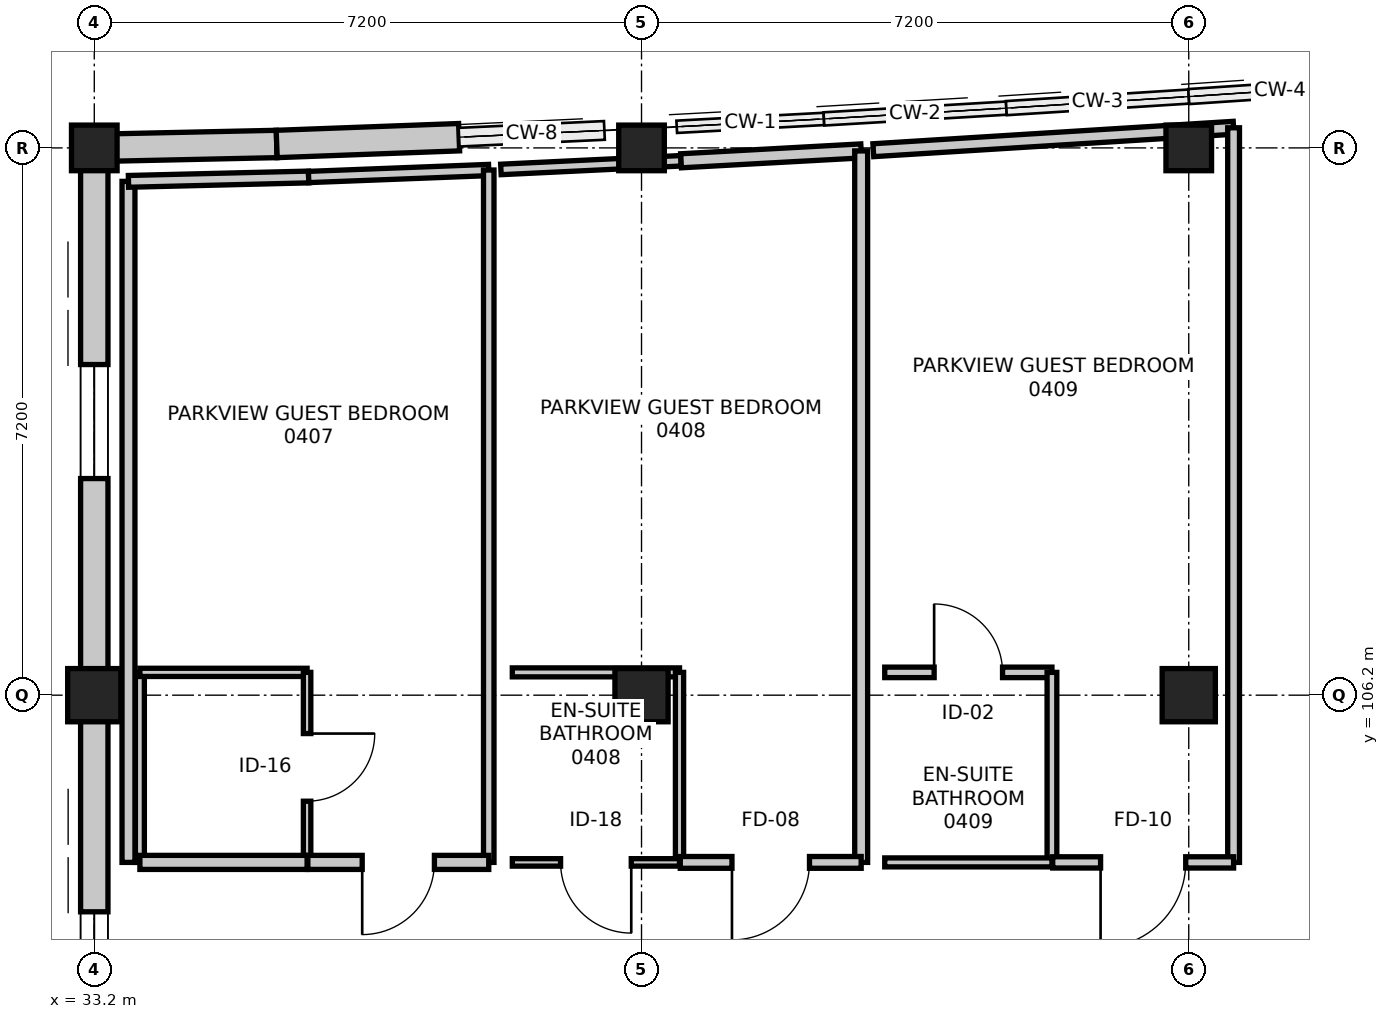
"""IFC4 building model, lengths in metres.
Left out: names, types, materials, properties, quantities, classifications, styles, units other than length and angle.
Written with IfcOpenShell. Run it as: python <this file> out.ifc"""

import sys

from ifc_helpers import new_model, si_unit, direction, frame, frame_2d, origin, origin_2d, place, context, subcontext, project, spatial, rectangle, extrude, element, fill, save


model = new_model("IFC4")
c1 = context("Model", 3, precision=1e-05, world=origin(), true_north=direction((0.0, 1.0)))
c2 = subcontext(c1, "Body", "Model", "MODEL_VIEW")
j1 = project(units=[si_unit("LENGTHUNIT", "METRE"), si_unit("PLANEANGLEUNIT", "RADIAN")], contexts=[c1])
p1 = place(None, origin())
s1 = spatial("IfcSite", under=j1, at=p1, CompositionType="ELEMENT")
p2 = place(p1, origin())
s2 = spatial("IfcBuilding", under=s1, at=p2, CompositionType="ELEMENT")
p3 = place(p2, frame((0.0, 0.0, 19.2)))
s3 = spatial("IfcBuildingStorey", under=s2, at=p3, CompositionType="ELEMENT", Elevation=19.2)
p4 = place(p3, frame((33.2, 106.2, 0.0), z_axis=(0.0, 0.0, 1.0), x_axis=(1.0, 0.0, 0.0)))
e1 = element("IfcColumn", 1, at=p4, inside=s3, PredefinedType="COLUMN", context=c2, shape_type="SweptSolid", body=[
    extrude(rectangle(XDim=0.7, YDim=0.7, at=origin_2d()), origin(), (0.0, 0.0, 1.0), 3.6),
])
p5 = place(p3, frame((33.2, 113.4, 0.0), z_axis=(0.0, 0.0, 1.0), x_axis=(1.0, 0.0, 0.0)))
e2 = element("IfcColumn", 2, at=p5, inside=s3, PredefinedType="COLUMN", context=c2, shape_type="SweptSolid", body=[
    extrude(rectangle(XDim=0.6, YDim=0.6, at=origin_2d()), origin(), (0.0, 0.0, 1.0), 3.6),
])
p6 = place(p3, frame((40.4, 106.2, 0.0), z_axis=(0.0, 0.0, 1.0), x_axis=(1.0, 0.0, 0.0)))
e3 = element("IfcColumn", 3, at=p6, inside=s3, PredefinedType="COLUMN", context=c2, shape_type="SweptSolid", body=[
    extrude(rectangle(XDim=0.7, YDim=0.7, at=origin_2d()), origin(), (0.0, 0.0, 1.0), 3.6),
])
p7 = place(p3, frame((40.4, 113.4, 0.0), z_axis=(0.0, 0.0, 1.0), x_axis=(1.0, 0.0, 0.0)))
e4 = element("IfcColumn", 4, at=p7, inside=s3, PredefinedType="COLUMN", context=c2, shape_type="SweptSolid", body=[
    extrude(rectangle(XDim=0.6, YDim=0.6, at=origin_2d()), origin(), (0.0, 0.0, 1.0), 3.6),
])
p8 = place(p3, frame((47.6, 106.2, 0.0), z_axis=(0.0, 0.0, 1.0), x_axis=(1.0, 0.0, 0.0)))
e5 = element("IfcColumn", 5, at=p8, inside=s3, PredefinedType="COLUMN", context=c2, shape_type="SweptSolid", body=[
    extrude(rectangle(XDim=0.7, YDim=0.7, at=origin_2d()), origin(), (0.0, 0.0, 1.0), 3.6),
])
p9 = place(p3, frame((47.6, 113.4, 0.0), z_axis=(0.0, 0.0, 1.0), x_axis=(1.0, 0.0, 0.0)))
e6 = element("IfcColumn", 6, at=p9, inside=s3, PredefinedType="COLUMN", context=c2, shape_type="SweptSolid", body=[
    extrude(rectangle(XDim=0.6, YDim=0.6, at=origin_2d()), origin(), (0.0, 0.0, 1.0), 3.6),
])
p10 = place(p3, frame((33.2, 99.0, 0.0), z_axis=(0.0, 0.0, 1.0), x_axis=(0.0, 1.0, 0.0)))
e7 = element("IfcWall", 7, at=p10, inside=s3, PredefinedType="STANDARD", context=c2, shape_type="SweptSolid", body=[
    extrude(rectangle(XDim=7.2, YDim=0.36, at=frame_2d((3.6, 0.0))), origin(), (0.0, 0.0, 1.0), 2.685),
])
p11 = place(p10, frame((2.85, 0.0, 0.75)))
e8 = element("IfcOpeningElement", 8, at=p11, cuts=e7, PredefinedType="OPENING", context=c2, shape_type="SweptSolid", body=[
    extrude(rectangle(XDim=1.5, YDim=1.5, at=frame_2d((0.75, 0.75))), frame((0.0, 0.19, 0.0), z_axis=(0.0, -1.0, 0.0), x_axis=(1.0, 0.0, 0.0)), (0.0, 0.0, 1.0), 0.38),
])
p12 = place(p3, frame((33.2, 106.2, 0.0), z_axis=(0.0, 0.0, 1.0), x_axis=(0.0, 1.0, 0.0)))
e9 = element("IfcWall", 9, at=p12, inside=s3, PredefinedType="STANDARD", context=c2, shape_type="SweptSolid", body=[
    extrude(rectangle(XDim=7.2, YDim=0.36, at=frame_2d((3.6, 0.0))), origin(), (0.0, 0.0, 1.0), 2.685),
])
p13 = place(p12, frame((2.85, 0.0, 0.75)))
e10 = element("IfcOpeningElement", 10, at=p13, cuts=e9, PredefinedType="OPENING", context=c2, shape_type="SweptSolid", body=[
    extrude(rectangle(XDim=1.5, YDim=1.5, at=frame_2d((0.75, 0.75))), frame((0.0, 0.19, 0.0), z_axis=(0.0, -1.0, 0.0), x_axis=(1.0, 0.0, 0.0)), (0.0, 0.0, 1.0), 0.38),
])
p14 = place(p3, frame((33.2, 113.4, 0.0), z_axis=(0.0, 0.0, 1.0), x_axis=(0.999767568547, 0.021559426766, 0.0)))
e11 = element("IfcWall", 11, at=p14, inside=s3, PredefinedType="STANDARD", context=c2, shape_type="SweptSolid", body=[
    extrude(rectangle(XDim=2.401, YDim=0.36, at=frame_2d((1.2, 0.0))), origin(), (0.0, 0.0, 1.0), 2.735),
])
p15 = place(p3, frame((35.6, 113.452, 0.0), z_axis=(0.0, 0.0, 1.0), x_axis=(0.99930757318, 0.037207179225, 0.0)))
e12 = element("IfcWall", 12, at=p15, inside=s3, PredefinedType="STANDARD", context=c2, shape_type="SweptSolid", body=[
    extrude(rectangle(XDim=2.402, YDim=0.36, at=frame_2d((1.201, 0.0))), origin(), (0.0, 0.0, 1.0), 2.735),
])
p16 = place(p3, frame((33.8, 104.0, 0.0), z_axis=(0.0, 0.0, 1.0), x_axis=(0.0, 1.0, 0.0)))
e13 = element("IfcWall", 13, at=p16, inside=s3, PredefinedType="PARTITIONING", context=c2, shape_type="SweptSolid", body=[
    extrude(rectangle(XDim=2.5, YDim=0.118, at=frame_2d((1.25, 0.0))), origin(), (0.0, 0.0, 1.0), 2.735),
])
p17 = place(p3, frame((33.8, 106.5, 0.0), z_axis=(0.0, 0.0, 1.0), x_axis=(1.0, 0.0, 0.0)))
e14 = element("IfcWall", 14, at=p17, inside=s3, PredefinedType="PARTITIONING", context=c2, shape_type="SweptSolid", body=[
    extrude(rectangle(XDim=2.2, YDim=0.108, at=frame_2d((1.1, 0.0))), origin(), (0.0, 0.0, 1.0), 3.35),
])
p18 = place(p3, frame((36.0, 106.5, 0.0), z_axis=(0.0, 0.0, 1.0), x_axis=(0.0, -1.0, 0.0)))
e15 = element("IfcWall", 15, at=p18, inside=s3, PredefinedType="PARTITIONING", context=c2, shape_type="SweptSolid", body=[
    extrude(rectangle(XDim=2.5, YDim=0.098, at=frame_2d((1.25, 0.0))), origin(), (0.0, 0.0, 1.0), 2.735),
])
p19 = place(p18, frame((0.805, 0.0, 0.0)))
e16 = element("IfcOpeningElement", 16, at=p19, cuts=e15, PredefinedType="OPENING", context=c2, shape_type="SweptSolid", body=[
    extrude(rectangle(XDim=0.89, YDim=2.09, at=frame_2d((0.445, 1.045))), frame((0.0, 0.059, 0.0), z_axis=(0.0, -1.0, 0.0), x_axis=(1.0, 0.0, 0.0)), (0.0, 0.0, 1.0), 0.118),
])
p20 = place(p3, frame((36.0, 104.0, 0.0), z_axis=(0.0, 0.0, 1.0), x_axis=(-1.0, 0.0, 0.0)))
e17 = element("IfcWall", 17, at=p20, inside=s3, PredefinedType="PARTITIONING", context=c2, shape_type="SweptSolid", body=[
    extrude(rectangle(XDim=2.2, YDim=0.185, at=frame_2d((1.1, 0.0))), origin(), (0.0, 0.0, 1.0), 3.35),
])
p21 = place(p3, frame((33.65, 104.0, 0.0), z_axis=(0.0, 0.0, 1.0), x_axis=(0.0, 1.0, 0.0)))
e18 = element("IfcWall", 18, at=p21, inside=s3, PredefinedType="PARTITIONING", context=c2, shape_type="SweptSolid", body=[
    extrude(rectangle(XDim=8.96, YDim=0.17, at=frame_2d((4.48, 0.0))), origin(), (0.0, 0.0, 1.0), 2.735),
])
p22 = place(p3, frame((33.65, 112.96, 0.0), z_axis=(0.0, 0.0, 1.0), x_axis=(0.999704646558, 0.024302667551, 0.0)))
e19 = element("IfcWall", 19, at=p22, inside=s3, PredefinedType="PARTITIONING", context=c2, shape_type="SweptSolid", body=[
    extrude(rectangle(XDim=2.371, YDim=0.155, at=frame_2d((1.186, 0.0))), origin(), (0.0, 0.0, 1.0), 3.35),
])
p23 = place(p3, frame((36.02, 113.017, 0.0), z_axis=(0.0, 0.0, 1.0), x_axis=(0.999250645602, 0.03870590736, 0.0)))
e20 = element("IfcWall", 20, at=p23, inside=s3, PredefinedType="PARTITIONING", context=c2, shape_type="SweptSolid", body=[
    extrude(rectangle(XDim=2.372, YDim=0.148, at=frame_2d((1.186, 0.0))), origin(), (0.0, 0.0, 1.0), 3.35),
])
p24 = place(p3, frame((38.39, 113.109, 0.0), z_axis=(0.0, 0.0, 1.0), x_axis=(0.0, -1.0, 0.0)))
e21 = element("IfcWall", 21, at=p24, inside=s3, PredefinedType="PARTITIONING", context=c2, shape_type="SweptSolid", body=[
    extrude(rectangle(XDim=9.109, YDim=0.138, at=frame_2d((4.555, 0.0))), origin(), (0.0, 0.0, 1.0), 2.735),
])
p25 = place(p3, frame((38.39, 104.0, 0.0), z_axis=(0.0, 0.0, 1.0), x_axis=(-1.0, 0.0, 0.0)))
e22 = element("IfcWall", 22, at=p25, inside=s3, PredefinedType="PARTITIONING", context=c2, shape_type="SweptSolid", body=[
    extrude(rectangle(XDim=2.38, YDim=0.185, at=frame_2d((1.19, 0.0))), origin(), (0.0, 0.0, 1.0), 3.35),
])
p26 = place(p25, frame((0.715, 0.0, 0.0)))
e23 = element("IfcOpeningElement", 23, at=p26, cuts=e22, PredefinedType="OPENING", context=c2, shape_type="SweptSolid", body=[
    extrude(rectangle(XDim=0.95, YDim=2.1, at=frame_2d((0.475, 1.05))), frame((0.0, 0.103, 0.0), z_axis=(0.0, -1.0, 0.0), x_axis=(1.0, 0.0, 0.0)), (0.0, 0.0, 1.0), 0.205),
])
p27 = place(p3, frame((38.7, 106.5, 0.0), z_axis=(0.0, 0.0, 1.0), x_axis=(1.0, 0.0, 0.0)))
e24 = element("IfcWall", 24, at=p27, inside=s3, PredefinedType="PARTITIONING", context=c2, shape_type="SweptSolid", body=[
    extrude(rectangle(XDim=2.2, YDim=0.118, at=frame_2d((1.1, 0.0))), origin(), (0.0, 0.0, 1.0), 2.685),
])
p28 = place(p3, frame((40.9, 106.5, 0.0), z_axis=(0.0, 0.0, 1.0), x_axis=(0.0, -1.0, 0.0)))
e25 = element("IfcWall", 25, at=p28, inside=s3, PredefinedType="PARTITIONING", context=c2, shape_type="SweptSolid", body=[
    extrude(rectangle(XDim=2.5, YDim=0.108, at=frame_2d((1.25, 0.0))), origin(), (0.0, 0.0, 1.0), 2.735),
])
p29 = place(p3, frame((40.9, 104.0, 0.0), z_axis=(0.0, 0.0, 1.0), x_axis=(-1.0, 0.0, 0.0)))
e26 = element("IfcWall", 26, at=p29, inside=s3, PredefinedType="PARTITIONING", context=c2, shape_type="SweptSolid", body=[
    extrude(rectangle(XDim=2.2, YDim=0.098, at=frame_2d((1.1, 0.0))), origin(), (0.0, 0.0, 1.0), 2.685),
])
p30 = place(p29, frame((0.635, 0.0, 0.0)))
e27 = element("IfcOpeningElement", 27, at=p30, cuts=e26, PredefinedType="OPENING", context=c2, shape_type="SweptSolid", body=[
    extrude(rectangle(XDim=0.93, YDim=2.13, at=frame_2d((0.465, 1.065))), frame((0.0, 0.059, 0.0), z_axis=(0.0, -1.0, 0.0), x_axis=(1.0, 0.0, 0.0)), (0.0, 0.0, 1.0), 0.118),
])
p31 = place(p3, frame((38.55, 113.117, 0.0), z_axis=(0.0, 0.0, 1.0), x_axis=(0.99884473767, 0.048054032398, 0.0)))
e28 = element("IfcWall", 28, at=p31, inside=s3, PredefinedType="PARTITIONING", context=c2, shape_type="SweptSolid", body=[
    extrude(rectangle(XDim=2.373, YDim=0.138, at=frame_2d((1.186, 0.0))), origin(), (0.0, 0.0, 1.0), 2.735),
])
p32 = place(p3, frame((40.92, 113.231, 0.0), z_axis=(0.0, 0.0, 1.0), x_axis=(0.998507458691, 0.054615519218, 0.0)))
e29 = element("IfcWall", 29, at=p32, inside=s3, PredefinedType="PARTITIONING", context=c2, shape_type="SweptSolid", body=[
    extrude(rectangle(XDim=2.374, YDim=0.185, at=frame_2d((1.187, 0.0))), origin(), (0.0, 0.0, 1.0), 2.735),
])
p33 = place(p3, frame((43.29, 113.36, 0.0), z_axis=(0.0, 0.0, 1.0), x_axis=(0.0, -1.0, 0.0)))
e30 = element("IfcWall", 30, at=p33, inside=s3, PredefinedType="PARTITIONING", context=c2, shape_type="SweptSolid", body=[
    extrude(rectangle(XDim=9.36, YDim=0.17, at=frame_2d((4.68, 0.0))), origin(), (0.0, 0.0, 1.0), 2.735),
])
p34 = place(p3, frame((43.29, 104.0, 0.0), z_axis=(0.0, 0.0, 1.0), x_axis=(-1.0, 0.0, 0.0)))
e31 = element("IfcWall", 31, at=p34, inside=s3, PredefinedType="PARTITIONING", context=c2, shape_type="SweptSolid", body=[
    extrude(rectangle(XDim=2.38, YDim=0.155, at=frame_2d((1.19, 0.0))), origin(), (0.0, 0.0, 1.0), 3.35),
])
p35 = place(p34, frame((0.68, 0.0, 0.0)))
e32 = element("IfcOpeningElement", 32, at=p35, cuts=e31, PredefinedType="OPENING", context=c2, shape_type="SweptSolid", body=[
    extrude(rectangle(XDim=1.02, YDim=2.15, at=frame_2d((0.51, 1.075))), frame((0.0, 0.087, 0.0), z_axis=(0.0, -1.0, 0.0), x_axis=(1.0, 0.0, 0.0)), (0.0, 0.0, 1.0), 0.175),
])
p36 = place(p3, frame((43.6, 106.5, 0.0), z_axis=(0.0, 0.0, 1.0), x_axis=(1.0, 0.0, 0.0)))
e33 = element("IfcWall", 33, at=p36, inside=s3, PredefinedType="PARTITIONING", context=c2, shape_type="SweptSolid", body=[
    extrude(rectangle(XDim=2.2, YDim=0.138, at=frame_2d((1.1, 0.0))), origin(), (0.0, 0.0, 1.0), 3.35),
])
p37 = place(p36, frame((0.65, 0.0, 0.0)))
e34 = element("IfcOpeningElement", 34, at=p37, cuts=e33, PredefinedType="OPENING", context=c2, shape_type="SweptSolid", body=[
    extrude(rectangle(XDim=0.9, YDim=2.08, at=frame_2d((0.45, 1.04))), frame((0.0, 0.079, 0.0), z_axis=(0.0, -1.0, 0.0), x_axis=(1.0, 0.0, 0.0)), (0.0, 0.0, 1.0), 0.158),
])
p38 = place(p3, frame((45.8, 106.5, 0.0), z_axis=(0.0, 0.0, 1.0), x_axis=(0.0, -1.0, 0.0)))
e35 = element("IfcWall", 35, at=p38, inside=s3, PredefinedType="PARTITIONING", context=c2, shape_type="SweptSolid", body=[
    extrude(rectangle(XDim=2.5, YDim=0.128, at=frame_2d((1.25, 0.0))), origin(), (0.0, 0.0, 1.0), 2.735),
])
p39 = place(p3, frame((45.8, 104.0, 0.0), z_axis=(0.0, 0.0, 1.0), x_axis=(-1.0, 0.0, 0.0)))
e36 = element("IfcWall", 36, at=p39, inside=s3, PredefinedType="PARTITIONING", context=c2, shape_type="SweptSolid", body=[
    extrude(rectangle(XDim=2.2, YDim=0.118, at=frame_2d((1.1, 0.0))), origin(), (0.0, 0.0, 1.0), 3.35),
])
p40 = place(p3, frame((43.45, 113.37, 0.0), z_axis=(0.0, 0.0, 1.0), x_axis=(0.998069942066, 0.062099844966, 0.0)))
e37 = element("IfcWall", 37, at=p40, inside=s3, PredefinedType="PARTITIONING", context=c2, shape_type="SweptSolid", body=[
    extrude(rectangle(XDim=4.749, YDim=0.17, at=frame_2d((2.375, 0.0))), origin(), (0.0, 0.0, 1.0), 2.735),
])
p41 = place(p3, frame((48.19, 113.665, 0.0), z_axis=(0.0, 0.0, 1.0), x_axis=(0.0, -1.0, 0.0)))
e38 = element("IfcWall", 38, at=p41, inside=s3, PredefinedType="PARTITIONING", context=c2, shape_type="SweptSolid", body=[
    extrude(rectangle(XDim=9.665, YDim=0.155, at=frame_2d((4.833, 0.0))), origin(), (0.0, 0.0, 1.0), 2.735),
])
p42 = place(p3, frame((48.19, 104.0, 0.0), z_axis=(0.0, 0.0, 1.0), x_axis=(-1.0, 0.0, 0.0)))
e39 = element("IfcWall", 39, at=p42, inside=s3, PredefinedType="PARTITIONING", context=c2, shape_type="SweptSolid", body=[
    extrude(rectangle(XDim=2.38, YDim=0.148, at=frame_2d((1.19, 0.0))), origin(), (0.0, 0.0, 1.0), 2.685),
])
p43 = place(p42, frame((0.63, 0.0, 0.0)))
e40 = element("IfcOpeningElement", 40, at=p43, cuts=e39, PredefinedType="OPENING", context=c2, shape_type="SweptSolid", body=[
    extrude(rectangle(XDim=1.12, YDim=2.2, at=frame_2d((0.56, 1.1))), frame((0.0, 0.084, 0.0), z_axis=(0.0, -1.0, 0.0), x_axis=(1.0, 0.0, 0.0)), (0.0, 0.0, 1.0), 0.168),
])
p44 = place(p11, origin())
e41 = element("IfcWindow", 41, at=p44, inside=s3, PartitioningType="SINGLE_PANEL", PredefinedType="WINDOW", context=c2, shape_type="SweptSolid", body=[
    extrude(rectangle(XDim=1.5, YDim=1.5, at=frame_2d((0.75, 0.75))), frame((0.0, 0.03, 0.0), z_axis=(0.0, -1.0, 0.0), x_axis=(1.0, 0.0, 0.0)), (0.0, 0.0, 1.0), 0.06),
])
fill(e8, e41)
p45 = place(p13, origin())
e42 = element("IfcWindow", 42, at=p45, inside=s3, PartitioningType="SINGLE_PANEL", PredefinedType="WINDOW", context=c2, shape_type="SweptSolid", body=[
    extrude(rectangle(XDim=1.5, YDim=1.5, at=frame_2d((0.75, 0.75))), frame((0.0, 0.03, 0.0), z_axis=(0.0, -1.0, 0.0), x_axis=(1.0, 0.0, 0.0)), (0.0, 0.0, 1.0), 0.06),
])
fill(e10, e42)
p46 = place(p19, origin())
e43 = element("IfcDoor", 43, at=p46, inside=s3, OperationType="SINGLE_SWING_LEFT", PredefinedType="DOOR", context=c2, shape_type="SweptSolid", body=[
    extrude(rectangle(XDim=0.89, YDim=2.09, at=frame_2d((0.445, 1.045))), frame((0.0, 0.025, 0.0), z_axis=(0.0, -1.0, 0.0), x_axis=(1.0, 0.0, 0.0)), (0.0, 0.0, 1.0), 0.05),
])
fill(e16, e43)
p47 = place(p26, origin())
e44 = element("IfcDoor", 44, at=p47, inside=s3, OperationType="SINGLE_SWING_RIGHT", PredefinedType="DOOR", context=c2, shape_type="SweptSolid", body=[
    extrude(rectangle(XDim=0.95, YDim=2.1, at=frame_2d((0.475, 1.05))), frame((0.0, 0.025, 0.0), z_axis=(0.0, -1.0, 0.0), x_axis=(1.0, 0.0, 0.0)), (0.0, 0.0, 1.0), 0.05),
])
fill(e23, e44)
p48 = place(p30, origin())
e45 = element("IfcDoor", 45, at=p48, inside=s3, OperationType="SINGLE_SWING_LEFT", PredefinedType="DOOR", context=c2, shape_type="SweptSolid", body=[
    extrude(rectangle(XDim=0.93, YDim=2.13, at=frame_2d((0.465, 1.065))), frame((0.0, 0.025, 0.0), z_axis=(0.0, -1.0, 0.0), x_axis=(1.0, 0.0, 0.0)), (0.0, 0.0, 1.0), 0.05),
])
fill(e27, e45)
p49 = place(p35, origin())
e46 = element("IfcDoor", 46, at=p49, inside=s3, OperationType="SINGLE_SWING_RIGHT", PredefinedType="DOOR", context=c2, shape_type="SweptSolid", body=[
    extrude(rectangle(XDim=1.02, YDim=2.15, at=frame_2d((0.51, 1.075))), frame((0.0, 0.025, 0.0), z_axis=(0.0, -1.0, 0.0), x_axis=(1.0, 0.0, 0.0)), (0.0, 0.0, 1.0), 0.05),
])
fill(e32, e46)
p50 = place(p37, origin())
e47 = element("IfcDoor", 47, at=p50, inside=s3, OperationType="SINGLE_SWING_LEFT", PredefinedType="DOOR", context=c2, shape_type="SweptSolid", body=[
    extrude(rectangle(XDim=0.9, YDim=2.08, at=frame_2d((0.45, 1.04))), frame((0.0, 0.025, 0.0), z_axis=(0.0, -1.0, 0.0), x_axis=(1.0, 0.0, 0.0)), (0.0, 0.0, 1.0), 0.05),
])
fill(e34, e47)
p51 = place(p43, origin())
e48 = element("IfcDoor", 48, at=p51, inside=s3, OperationType="SINGLE_SWING_RIGHT", PredefinedType="DOOR", context=c2, shape_type="SweptSolid", body=[
    extrude(rectangle(XDim=1.12, YDim=2.2, at=frame_2d((0.56, 1.1))), frame((0.0, 0.025, 0.0), z_axis=(0.0, -1.0, 0.0), x_axis=(1.0, 0.0, 0.0)), (0.0, 0.0, 1.0), 0.05),
])
fill(e40, e48)
save(model, sys.argv[1])
